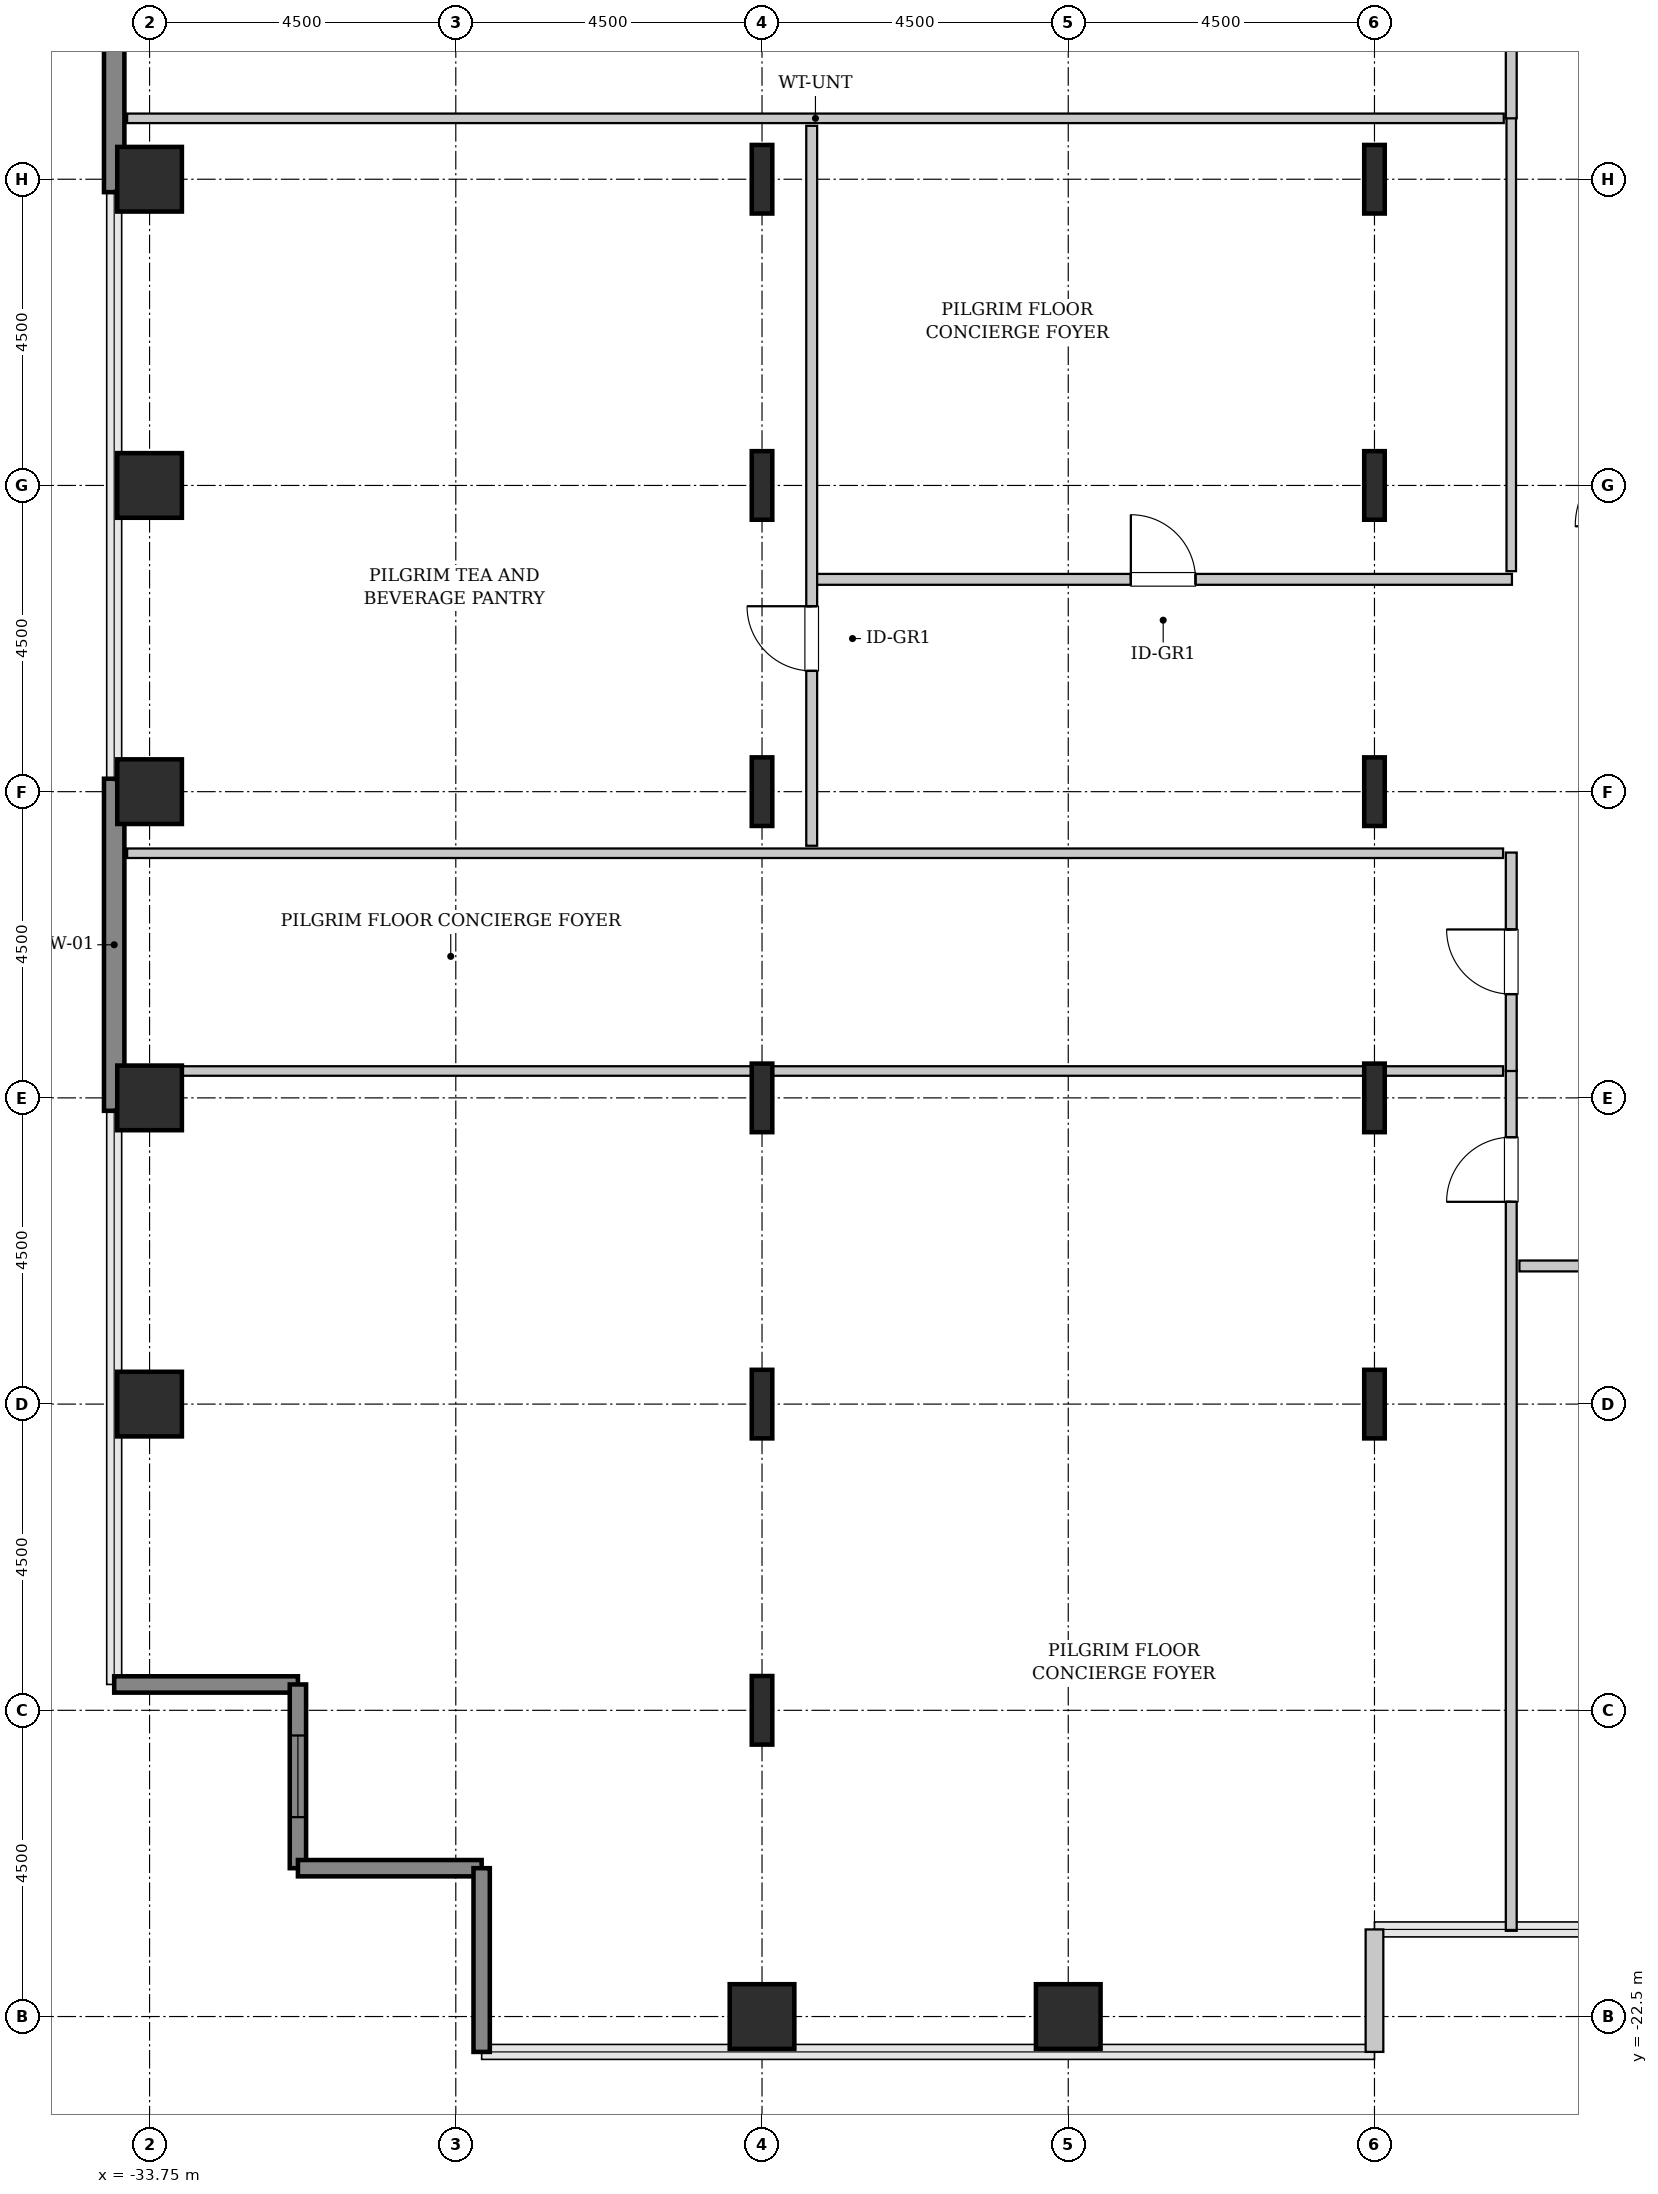
"""IFC4 building model, lengths in metres.
Left out: names, types, materials, properties, quantities, classifications, styles, units other than length and angle.
Written with IfcOpenShell. Run it as: python <this file> out.ifc"""

import sys

from ifc_helpers import new_model, si_unit, direction, frame, frame_2d, origin, origin_2d, place, context, subcontext, project, spatial, rectangle, hollow_rectangle, i_section, extrude, source, transform, mapped, element, fill, save


model = new_model("IFC4")
c1 = context("Model", 3, precision=1e-05, world=origin(), true_north=direction((0.0, 1.0)))
c2 = subcontext(c1, "Body", "Model", "MODEL_VIEW")
j1 = project(units=[si_unit("LENGTHUNIT", "METRE"), si_unit("PLANEANGLEUNIT", "RADIAN")], contexts=[c1])
p1 = place(None, origin())
s1 = spatial("IfcSite", under=j1, at=p1, CompositionType="ELEMENT")
p2 = place(p1, origin())
s2 = spatial("IfcBuilding", under=s1, at=p2, CompositionType="ELEMENT")
p3 = place(p2, frame((0.0, 0.0, 67.2)))
s3 = spatial("IfcBuildingStorey", under=s2, at=p3, CompositionType="ELEMENT", Elevation=67.2)
m1 = source(origin(), c2, "Body", "SweptSolid", [
    extrude(hollow_rectangle(XDim=0.95, YDim=0.95, WallThickness=0.045, InnerFilletRadius=0.045, OuterFilletRadius=0.09, at=origin_2d()), origin(), (0.0, 0.0, 1.0), 3.8),
])
for number, where, z_axis, x_axis in (
    (1, (-33.75, -13.5, 0.0), (0.0, 0.0, 1.0), (1.0, 0.0, 0.0)),
    (2, (-33.75, -9.0, 0.0), (0.0, 0.0, 1.0), (1.0, 0.0, 0.0)),
    (3, (-33.75, -4.5, 0.0), (0.0, 0.0, 1.0), (1.0, 0.0, 0.0)),
    (4, (-33.75, 0.0, 0.0), (0.0, 0.0, 1.0), (1.0, 0.0, 0.0)),
    (5, (-33.75, 4.5, 0.0), (0.0, 0.0, 1.0), (1.0, 0.0, 0.0)),
    (6, (-24.75, -22.5, 0.0), (0.0, 0.0, 1.0), (1.0, 0.0, 0.0)),
):
    element("IfcColumn", number, at=place(p3, frame(where, z_axis=z_axis, x_axis=x_axis)), inside=s3, PredefinedType="COLUMN", context=c2, shape_type="MappedRepresentation", body=[
        mapped(m1, transform((0.0, 0.0, 0.0), x_axis=(1.0, 0.0, 0.0), y_axis=(0.0, 1.0, 0.0), z_axis=(0.0, 0.0, 1.0), scale=1.0)),
    ])
m2 = source(origin(), c2, "Body", "SweptSolid", [
    extrude(i_section(OverallWidth=0.302, OverallDepth=1.008, WebThickness=0.021, FlangeThickness=0.04, FilletRadius=0.03, at=origin_2d()), origin(), (0.0, 0.0, 1.0), 3.8),
])
for number, where, z_axis, x_axis in (
    (7, (-24.75, -18.0, 0.0), (0.0, 0.0, 1.0), (1.0, 0.0, 0.0)),
    (8, (-24.75, -13.5, 0.0), (0.0, 0.0, 1.0), (1.0, 0.0, 0.0)),
    (9, (-24.75, -9.0, 0.0), (0.0, 0.0, 1.0), (1.0, 0.0, 0.0)),
    (10, (-24.75, -4.5, 0.0), (0.0, 0.0, 1.0), (1.0, 0.0, 0.0)),
    (11, (-24.75, 0.0, 0.0), (0.0, 0.0, 1.0), (1.0, 0.0, 0.0)),
    (12, (-24.75, 4.5, 0.0), (0.0, 0.0, 1.0), (1.0, 0.0, 0.0)),
):
    element("IfcColumn", number, at=place(p3, frame(where, z_axis=z_axis, x_axis=x_axis)), inside=s3, PredefinedType="COLUMN", context=c2, shape_type="MappedRepresentation", body=[
        mapped(m2, transform((0.0, 0.0, 0.0), x_axis=(1.0, 0.0, 0.0), y_axis=(0.0, 1.0, 0.0), z_axis=(0.0, 0.0, 1.0), scale=1.0)),
    ])
p4 = place(p3, frame((-20.25, -22.5, 0.0), z_axis=(0.0, 0.0, 1.0), x_axis=(1.0, 0.0, 0.0)))
e13 = element("IfcColumn", 13, at=p4, inside=s3, PredefinedType="COLUMN", context=c2, shape_type="MappedRepresentation", body=[
    mapped(m1, transform((0.0, 0.0, 0.0), x_axis=(1.0, 0.0, 0.0), y_axis=(0.0, 1.0, 0.0), z_axis=(0.0, 0.0, 1.0), scale=1.0)),
])
for number, where, z_axis, x_axis in (
    (14, (-15.75, -13.5, 0.0), (0.0, 0.0, 1.0), (1.0, 0.0, 0.0)),
    (15, (-15.75, -9.0, 0.0), (0.0, 0.0, 1.0), (1.0, 0.0, 0.0)),
    (16, (-15.75, -4.5, 0.0), (0.0, 0.0, 1.0), (1.0, 0.0, 0.0)),
    (17, (-15.75, 0.0, 0.0), (0.0, 0.0, 1.0), (1.0, 0.0, 0.0)),
    (18, (-15.75, 4.5, 0.0), (0.0, 0.0, 1.0), (1.0, 0.0, 0.0)),
):
    element("IfcColumn", number, at=place(p3, frame(where, z_axis=z_axis, x_axis=x_axis)), inside=s3, PredefinedType="COLUMN", context=c2, shape_type="MappedRepresentation", body=[
        mapped(m2, transform((0.0, 0.0, 0.0), x_axis=(1.0, 0.0, 0.0), y_axis=(0.0, 1.0, 0.0), z_axis=(0.0, 0.0, 1.0), scale=1.0)),
    ])
m3 = source(origin(), c2, "Body", "SweptSolid", [
    extrude(rectangle(XDim=4.88, YDim=0.3, at=frame_2d((2.44, 0.0))), origin(), (0.0, 0.0, 1.0), 3.55),
])
for number, where, z_axis, x_axis in (
    (19, (-34.27, -9.19, 0.0), (0.0, 0.0, 1.0), (0.0, 1.0, 0.0)),
    (20, (-34.27, 4.31, 0.0), (0.0, 0.0, 1.0), (0.0, 1.0, 0.0)),
):
    element("IfcWall", number, at=place(p3, frame(where, z_axis=z_axis, x_axis=x_axis)), inside=s3, PredefinedType="SHEAR", context=c2, shape_type="MappedRepresentation", body=[
        mapped(m3, transform((0.0, 0.0, 0.0), x_axis=(1.0, 0.0, 0.0), y_axis=(0.0, 1.0, 0.0), z_axis=(0.0, 0.0, 1.0), scale=1.0)),
    ])
m4 = source(origin(), c2, "Body", "SweptSolid", [
    extrude(rectangle(XDim=2.7, YDim=0.24, at=frame_2d((1.35, 0.0))), origin(), (0.0, 0.0, 1.0), 3.55),
])
p5 = place(p3, frame((-34.27, -17.62, 0.0), z_axis=(0.0, 0.0, 1.0), x_axis=(1.0, 0.0, 0.0)))
e21 = element("IfcWall", 21, at=p5, inside=s3, PredefinedType="SHEAR", context=c2, shape_type="MappedRepresentation", body=[
    mapped(m4, transform((0.0, 0.0, 0.0), x_axis=(1.0, 0.0, 0.0), y_axis=(0.0, 1.0, 0.0), z_axis=(0.0, 0.0, 1.0), scale=1.0)),
])
p6 = place(p3, frame((-31.57, -17.62, 0.0), z_axis=(0.0, 0.0, 1.0), x_axis=(0.0, -1.0, 0.0)))
e22 = element("IfcWall", 22, at=p6, inside=s3, PredefinedType="SHEAR", context=c2, shape_type="MappedRepresentation", body=[
    mapped(m4, transform((0.0, 0.0, 0.0), x_axis=(1.0, 0.0, 0.0), y_axis=(0.0, 1.0, 0.0), z_axis=(0.0, 0.0, 1.0), scale=1.0)),
])
p7 = place(p6, frame((0.75, 0.0, 0.85)))
e23 = element("IfcOpeningElement", 23, at=p7, cuts=e22, PredefinedType="OPENING", context=c2, shape_type="SweptSolid", body=[
    extrude(rectangle(XDim=1.2, YDim=1.8, at=frame_2d((0.6, 0.9))), frame((0.0, 0.13, 0.0), z_axis=(0.0, -1.0, 0.0), x_axis=(1.0, 0.0, 0.0)), (0.0, 0.0, 1.0), 0.26),
])
for number, where, z_axis, x_axis in (
    (24, (-31.57, -20.32, 0.0), (0.0, 0.0, 1.0), (1.0, 0.0, 0.0)),
    (25, (-28.87, -20.32, 0.0), (0.0, 0.0, 1.0), (0.0, -1.0, 0.0)),
):
    element("IfcWall", number, at=place(p3, frame(where, z_axis=z_axis, x_axis=x_axis)), inside=s3, PredefinedType="SHEAR", context=c2, shape_type="MappedRepresentation", body=[
        mapped(m4, transform((0.0, 0.0, 0.0), x_axis=(1.0, 0.0, 0.0), y_axis=(0.0, 1.0, 0.0), z_axis=(0.0, 0.0, 1.0), scale=1.0)),
    ])
m5 = source(origin(), c2, "Body", "SweptSolid", [
    extrude(rectangle(XDim=1.8, YDim=0.26, at=frame_2d((0.9, 0.0))), origin(), (0.0, 0.0, 1.0), 3.55),
])
p8 = place(p3, frame((-15.75, -23.02, 0.0), z_axis=(0.0, 0.0, 1.0), x_axis=(0.0, 1.0, 0.0)))
e26 = element("IfcWall", 26, at=p8, inside=s3, PredefinedType="SOLIDWALL", context=c2, shape_type="MappedRepresentation", body=[
    mapped(m5, transform((0.0, 0.0, 0.0), x_axis=(1.0, 0.0, 0.0), y_axis=(0.0, 1.0, 0.0), z_axis=(0.0, 0.0, 1.0), scale=1.0)),
])
m6 = source(origin(), c2, "Body", "SweptSolid", [
    extrude(rectangle(XDim=12.645, YDim=0.16, at=frame_2d((6.323, 0.0))), origin(), (0.0, 0.0, 1.0), 3.535),
])
p9 = place(p3, frame((-13.74, -21.24, 0.0), z_axis=(0.0, 0.0, 1.0), x_axis=(0.0, 1.0, 0.0)))
e27 = element("IfcWall", 27, at=p9, inside=s3, PredefinedType="PARTITIONING", context=c2, shape_type="MappedRepresentation", body=[
    mapped(m6, transform((0.0, 0.0, 0.0), x_axis=(1.0, 0.0, 0.0), y_axis=(0.0, 1.0, 0.0), z_axis=(0.0, 0.0, 1.0), scale=1.0)),
])
p10 = place(p9, frame((10.712, 0.0, 0.0)))
e28 = element("IfcOpeningElement", 28, at=p10, cuts=e27, PredefinedType="OPENING", context=c2, shape_type="SweptSolid", body=[
    extrude(rectangle(XDim=0.95, YDim=2.1, at=frame_2d((0.475, 1.05))), frame((0.0, 0.09, 0.0), z_axis=(0.0, -1.0, 0.0), x_axis=(1.0, 0.0, 0.0)), (0.0, 0.0, 1.0), 0.18),
])
m7 = source(origin(), c2, "Body", "SweptSolid", [
    extrude(rectangle(XDim=20.22, YDim=0.14, at=frame_2d((10.11, 0.0))), origin(), (0.0, 0.0, 1.0), 2.825),
])
p11 = place(p3, frame((-34.08, -8.605, 0.0), z_axis=(0.0, 0.0, 1.0), x_axis=(1.0, 0.0, 0.0)))
e29 = element("IfcWall", 29, at=p11, inside=s3, PredefinedType="PARTITIONING", context=c2, shape_type="MappedRepresentation", body=[
    mapped(m7, transform((0.0, 0.0, 0.0), x_axis=(1.0, 0.0, 0.0), y_axis=(0.0, 1.0, 0.0), z_axis=(0.0, 0.0, 1.0), scale=1.0)),
])
m8 = source(origin(), c2, "Body", "SweptSolid", [
    extrude(rectangle(XDim=3.21, YDim=0.16, at=frame_2d((1.605, 0.0))), origin(), (0.0, 0.0, 1.0), 3.535),
])
p12 = place(p3, frame((-13.74, -8.605, 0.0), z_axis=(0.0, 0.0, 1.0), x_axis=(0.0, 1.0, 0.0)))
e30 = element("IfcWall", 30, at=p12, inside=s3, PredefinedType="PARTITIONING", context=c2, shape_type="MappedRepresentation", body=[
    mapped(m8, transform((0.0, 0.0, 0.0), x_axis=(1.0, 0.0, 0.0), y_axis=(0.0, 1.0, 0.0), z_axis=(0.0, 0.0, 1.0), scale=1.0)),
])
p13 = place(p12, frame((1.13, 0.0, 0.0)))
e31 = element("IfcOpeningElement", 31, at=p13, cuts=e30, PredefinedType="OPENING", context=c2, shape_type="SweptSolid", body=[
    extrude(rectangle(XDim=0.95, YDim=2.1, at=frame_2d((0.475, 1.05))), frame((0.0, 0.09, 0.0), z_axis=(0.0, -1.0, 0.0), x_axis=(1.0, 0.0, 0.0)), (0.0, 0.0, 1.0), 0.18),
])
m9 = source(origin(), c2, "Body", "SweptSolid", [
    extrude(rectangle(XDim=20.22, YDim=0.14, at=frame_2d((10.11, 0.0))), origin(), (0.0, 0.0, 1.0), 3.535),
])
p14 = place(p3, frame((-34.08, -5.405, 0.0), z_axis=(0.0, 0.0, 1.0), x_axis=(1.0, 0.0, 0.0)))
e32 = element("IfcWall", 32, at=p14, inside=s3, PredefinedType="PARTITIONING", context=c2, shape_type="MappedRepresentation", body=[
    mapped(m9, transform((0.0, 0.0, 0.0), x_axis=(1.0, 0.0, 0.0), y_axis=(0.0, 1.0, 0.0), z_axis=(0.0, 0.0, 1.0), scale=1.0)),
])
m10 = source(origin(), c2, "Body", "SweptSolid", [
    extrude(rectangle(XDim=10.25, YDim=0.16, at=frame_2d((5.125, 0.0))), origin(), (0.0, 0.0, 1.0), 3.535),
])
p15 = place(p3, frame((-23.98, -1.38, 0.0), z_axis=(0.0, 0.0, 1.0), x_axis=(1.0, 0.0, 0.0)))
e33 = element("IfcWall", 33, at=p15, inside=s3, PredefinedType="PARTITIONING", context=c2, shape_type="MappedRepresentation", body=[
    mapped(m10, transform((0.0, 0.0, 0.0), x_axis=(1.0, 0.0, 0.0), y_axis=(0.0, 1.0, 0.0), z_axis=(0.0, 0.0, 1.0), scale=1.0)),
])
p16 = place(p15, frame((4.65, 0.0, 0.0)))
e34 = element("IfcOpeningElement", 34, at=p16, cuts=e33, PredefinedType="OPENING", context=c2, shape_type="SweptSolid", body=[
    extrude(rectangle(XDim=0.95, YDim=2.1, at=frame_2d((0.475, 1.05))), frame((0.0, 0.09, 0.0), z_axis=(0.0, -1.0, 0.0), x_axis=(1.0, 0.0, 0.0)), (0.0, 0.0, 1.0), 0.18),
])
m11 = source(origin(), c2, "Body", "SweptSolid", [
    extrude(rectangle(XDim=6.665, YDim=0.14, at=frame_2d((3.333, 0.0))), origin(), (0.0, 0.0, 1.0), 3.535),
])
p17 = place(p3, frame((-13.74, -1.26, 0.0), z_axis=(0.0, 0.0, 1.0), x_axis=(0.0, 1.0, 0.0)))
e35 = element("IfcWall", 35, at=p17, inside=s3, PredefinedType="PARTITIONING", context=c2, shape_type="MappedRepresentation", body=[
    mapped(m11, transform((0.0, 0.0, 0.0), x_axis=(1.0, 0.0, 0.0), y_axis=(0.0, 1.0, 0.0), z_axis=(0.0, 0.0, 1.0), scale=1.0)),
])
m12 = source(origin(), c2, "Body", "SweptSolid", [
    extrude(rectangle(XDim=20.23, YDim=0.14, at=frame_2d((10.115, 0.0))), origin(), (0.0, 0.0, 1.0), 3.535),
])
p18 = place(p3, frame((-34.08, 5.395, 0.0), z_axis=(0.0, 0.0, 1.0), x_axis=(1.0, 0.0, 0.0)))
e36 = element("IfcWall", 36, at=p18, inside=s3, PredefinedType="PARTITIONING", context=c2, shape_type="MappedRepresentation", body=[
    mapped(m12, transform((0.0, 0.0, 0.0), x_axis=(1.0, 0.0, 0.0), y_axis=(0.0, 1.0, 0.0), z_axis=(0.0, 0.0, 1.0), scale=1.0)),
])
m13 = source(origin(), c2, "Body", "SweptSolid", [
    extrude(rectangle(XDim=10.58, YDim=0.16, at=frame_2d((5.29, 0.0))), origin(), (0.0, 0.0, 1.0), 3.535),
])
p19 = place(p3, frame((-24.02, -5.295, 0.0), z_axis=(0.0, 0.0, 1.0), x_axis=(0.0, 1.0, 0.0)))
e37 = element("IfcWall", 37, at=p19, inside=s3, PredefinedType="PARTITIONING", context=c2, shape_type="MappedRepresentation", body=[
    mapped(m13, transform((0.0, 0.0, 0.0), x_axis=(1.0, 0.0, 0.0), y_axis=(0.0, 1.0, 0.0), z_axis=(0.0, 0.0, 1.0), scale=1.0)),
])
p20 = place(p19, frame((2.57, 0.0, 0.0)))
e38 = element("IfcOpeningElement", 38, at=p20, cuts=e37, PredefinedType="OPENING", context=c2, shape_type="SweptSolid", body=[
    extrude(rectangle(XDim=0.95, YDim=2.1, at=frame_2d((0.475, 1.05))), frame((0.0, 0.09, 0.0), z_axis=(0.0, -1.0, 0.0), x_axis=(1.0, 0.0, 0.0)), (0.0, 0.0, 1.0), 0.18),
])
p21 = place(p3, frame((-13.74, 5.395, 0.0), z_axis=(0.0, 0.0, 1.0), x_axis=(0.0, 1.0, 0.0)))
e39 = element("IfcWall", 39, at=p21, inside=s3, PredefinedType="PARTITIONING", context=c2, shape_type="MappedRepresentation", body=[
    mapped(m8, transform((0.0, 0.0, 0.0), x_axis=(1.0, 0.0, 0.0), y_axis=(0.0, 1.0, 0.0), z_axis=(0.0, 0.0, 1.0), scale=1.0)),
])
p22 = place(p21, frame((1.13, 0.0, 0.0)))
e40 = element("IfcOpeningElement", 40, at=p22, cuts=e39, PredefinedType="OPENING", context=c2, shape_type="SweptSolid", body=[
    extrude(rectangle(XDim=0.95, YDim=2.1, at=frame_2d((0.475, 1.05))), frame((0.0, 0.09, 0.0), z_axis=(0.0, -1.0, 0.0), x_axis=(1.0, 0.0, 0.0)), (0.0, 0.0, 1.0), 0.18),
])
m14 = source(origin(), c2, "Body", "SweptSolid", [
    extrude(rectangle(XDim=7.225, YDim=0.16, at=frame_2d((3.613, 0.0))), origin(), (0.0, 0.0, 1.0), 3.535),
])
p23 = place(p3, frame((-13.62, -11.47, 0.0), z_axis=(0.0, 0.0, 1.0), x_axis=(1.0, 0.0, 0.0)))
e41 = element("IfcWall", 41, at=p23, inside=s3, PredefinedType="PARTITIONING", context=c2, shape_type="MappedRepresentation", body=[
    mapped(m14, transform((0.0, 0.0, 0.0), x_axis=(1.0, 0.0, 0.0), y_axis=(0.0, 1.0, 0.0), z_axis=(0.0, 0.0, 1.0), scale=1.0)),
])
p24 = place(p23, frame((3.137, 0.0, 0.0)))
e42 = element("IfcOpeningElement", 42, at=p24, cuts=e41, PredefinedType="OPENING", context=c2, shape_type="SweptSolid", body=[
    extrude(rectangle(XDim=0.95, YDim=2.1, at=frame_2d((0.475, 1.05))), frame((0.0, 0.09, 0.0), z_axis=(0.0, -1.0, 0.0), x_axis=(1.0, 0.0, 0.0)), (0.0, 0.0, 1.0), 0.18),
])
m15 = source(origin(), c2, "Body", "SweptSolid", [
    extrude(rectangle(XDim=1.2, YDim=1.8, at=frame_2d((0.6, 0.9))), frame((0.0, 0.03, 0.0), z_axis=(0.0, -1.0, 0.0), x_axis=(1.0, 0.0, 0.0)), (0.0, 0.0, 1.0), 0.06),
])
p25 = place(p7, origin())
e43 = element("IfcWindow", 43, at=p25, inside=s3, PartitioningType="SINGLE_PANEL", PredefinedType="WINDOW", context=c2, shape_type="MappedRepresentation", body=[
    mapped(m15, transform((0.0, 0.0, 0.0), x_axis=(1.0, 0.0, 0.0), y_axis=(0.0, 1.0, 0.0), z_axis=(0.0, 0.0, 1.0), scale=1.0)),
])
fill(e23, e43)
m16 = source(origin(), c2, "Body", "SweptSolid", [
    extrude(rectangle(XDim=0.95, YDim=2.1, at=frame_2d((0.475, 1.05))), frame((0.0, 0.025, 0.0), z_axis=(0.0, -1.0, 0.0), x_axis=(1.0, 0.0, 0.0)), (0.0, 0.0, 1.0), 0.05),
])
p26 = place(p10, origin())
e44 = element("IfcDoor", 44, at=p26, inside=s3, OperationType="SINGLE_SWING_LEFT", PredefinedType="DOOR", context=c2, shape_type="MappedRepresentation", body=[
    mapped(m16, transform((0.0, 0.0, 0.0), x_axis=(1.0, 0.0, 0.0), y_axis=(0.0, 1.0, 0.0), z_axis=(0.0, 0.0, 1.0), scale=1.0)),
])
fill(e28, e44)
p27 = place(p13, origin())
e45 = element("IfcDoor", 45, at=p27, inside=s3, OperationType="SINGLE_SWING_RIGHT", PredefinedType="DOOR", context=c2, shape_type="MappedRepresentation", body=[
    mapped(m16, transform((0.0, 0.0, 0.0), x_axis=(1.0, 0.0, 0.0), y_axis=(0.0, 1.0, 0.0), z_axis=(0.0, 0.0, 1.0), scale=1.0)),
])
fill(e31, e45)
p28 = place(p16, origin())
e46 = element("IfcDoor", 46, at=p28, inside=s3, OperationType="SINGLE_SWING_LEFT", PredefinedType="DOOR", context=c2, shape_type="MappedRepresentation", body=[
    mapped(m16, transform((0.0, 0.0, 0.0), x_axis=(1.0, 0.0, 0.0), y_axis=(0.0, 1.0, 0.0), z_axis=(0.0, 0.0, 1.0), scale=1.0)),
])
fill(e34, e46)
p29 = place(p20, origin())
e47 = element("IfcDoor", 47, at=p29, inside=s3, OperationType="SINGLE_SWING_RIGHT", PredefinedType="DOOR", context=c2, shape_type="MappedRepresentation", body=[
    mapped(m16, transform((0.0, 0.0, 0.0), x_axis=(1.0, 0.0, 0.0), y_axis=(0.0, 1.0, 0.0), z_axis=(0.0, 0.0, 1.0), scale=1.0)),
])
fill(e38, e47)
save(model, sys.argv[1])
